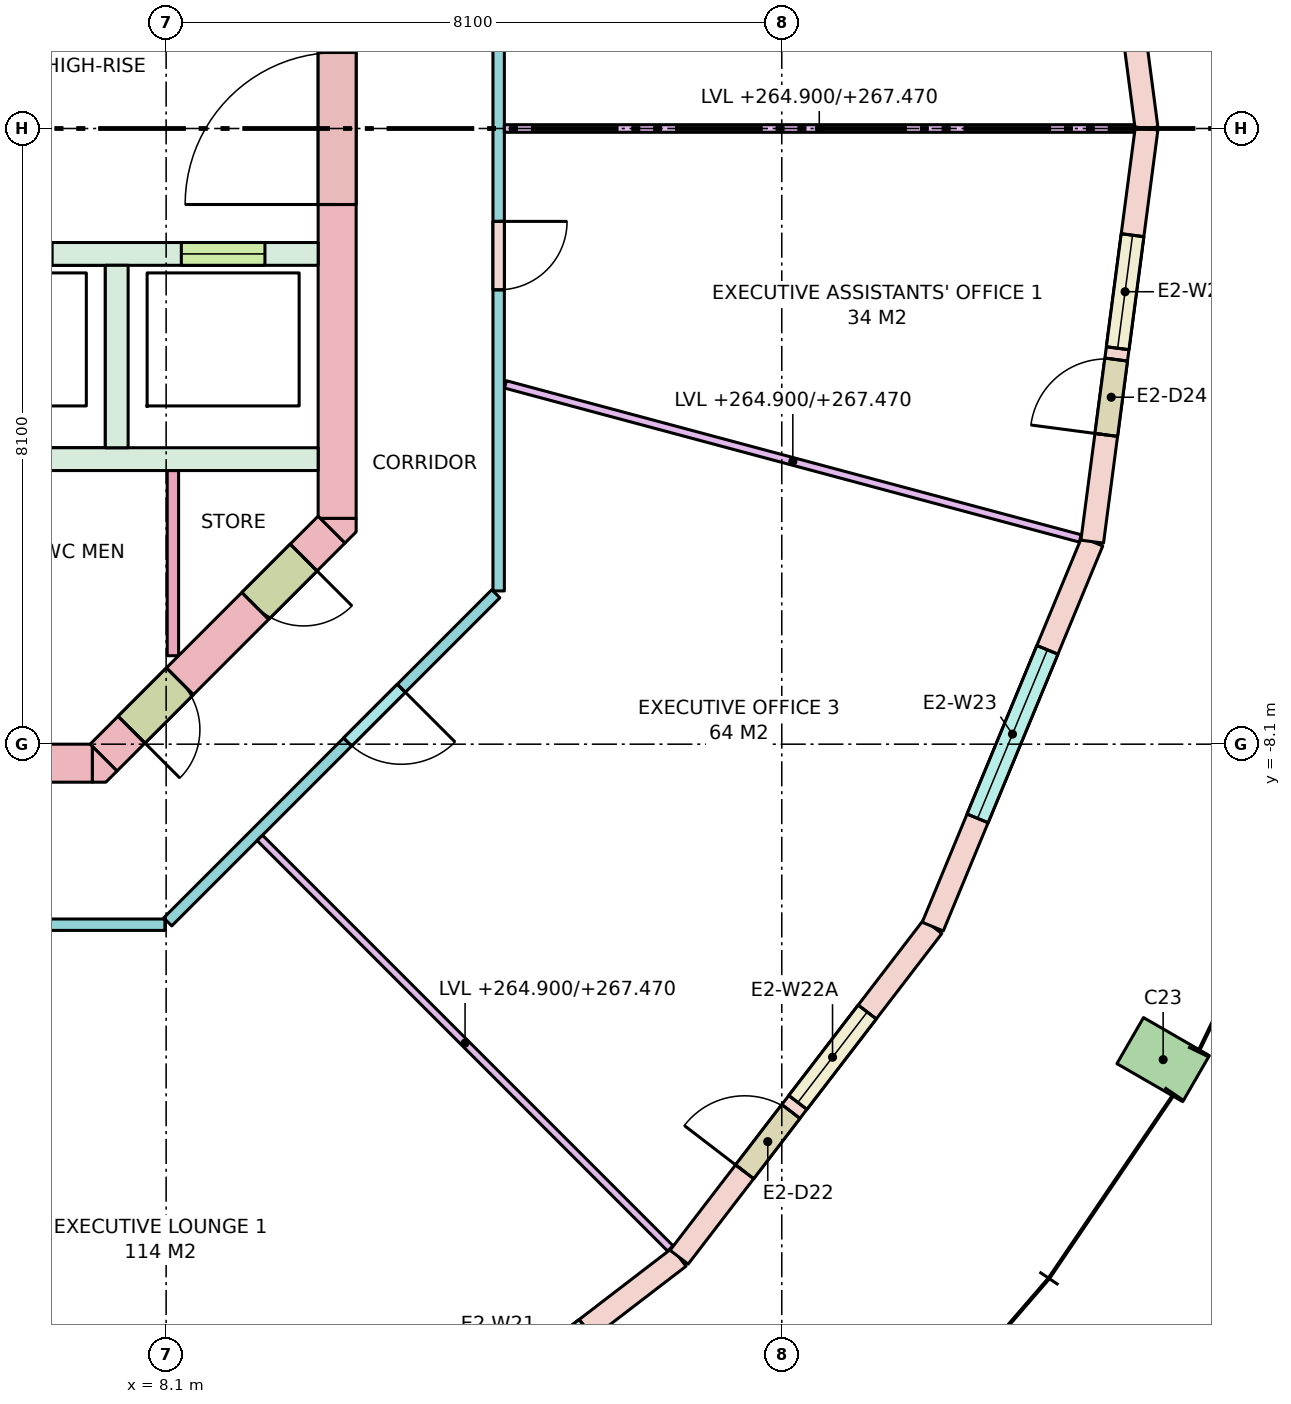
"""IFC4 building model, lengths in metres.
Left out: names, types, materials, properties, quantities, classifications, styles, units other than length and angle.
Written with IfcOpenShell. Run it as: python <this file> out.ifc"""

import sys

from ifc_helpers import new_model, si_unit, direction, frame, frame_2d, origin, origin_2d, place, context, subcontext, project, spatial, polyline, rectangle, outline, extrude, element, fill, save


model = new_model("IFC4")
c1 = context("Model", 3, precision=1e-05, world=origin(), true_north=direction((0.0, 1.0)))
c2 = subcontext(c1, "Body", "Model", "MODEL_VIEW")
j1 = project(units=[si_unit("LENGTHUNIT", "METRE"), si_unit("PLANEANGLEUNIT", "RADIAN")], contexts=[c1])
p1 = place(None, origin())
s1 = spatial("IfcSite", under=j1, at=p1, CompositionType="ELEMENT")
p2 = place(p1, origin())
s2 = spatial("IfcBuilding", under=s1, at=p2, CompositionType="ELEMENT")
p3 = place(p2, frame((0.0, 0.0, 264.9)))
s3 = spatial("IfcBuildingStorey", under=s2, at=p3, CompositionType="ELEMENT", Elevation=264.9)
p4 = place(p3, frame((21.218, -12.25, 0.0), z_axis=(0.0, 0.0, 1.0), x_axis=(0.5, 0.866025403784, 0.0)))
e1 = element("IfcColumn", 1, at=p4, inside=s3, PredefinedType="COLUMN", context=c2, shape_type="SweptSolid", body=[
    extrude(rectangle(XDim=0.7, YDim=1.0, at=origin_2d()), origin(), (0.0, 0.0, 1.0), 3.7),
])
p5 = place(p3, frame((-7.13, -8.35, -0.28), z_axis=(0.0, 0.0, 1.0), x_axis=(1.0, 0.0, 0.0)))
e2 = element("IfcWall", 2, at=p5, inside=s3, PredefinedType="SHEAR", context=c2, shape_type="SweptSolid", body=[
    extrude(rectangle(XDim=14.26, YDim=0.5, at=frame_2d((7.13, 0.0))), origin(), (0.0, 0.0, 1.0), 3.7),
])
p6 = place(p5, frame((8.08, 0.0, 0.28)))
e3 = element("IfcOpeningElement", 3, at=p6, cuts=e2, PredefinedType="OPENING", context=c2, shape_type="SweptSolid", body=[
    extrude(rectangle(XDim=0.7, YDim=2.1, at=frame_2d((0.35, 1.05))), frame((0.0, 0.26, 0.0), z_axis=(0.0, -1.0, 0.0), x_axis=(1.0, 0.0, 0.0)), (0.0, 0.0, 1.0), 0.52),
])
p7 = place(p5, frame((5.58, 0.0, 0.28)))
e4 = element("IfcOpeningElement", 4, at=p7, cuts=e2, PredefinedType="OPENING", context=c2, shape_type="SweptSolid", body=[
    extrude(rectangle(XDim=0.85, YDim=2.1, at=frame_2d((0.425, 1.05))), frame((0.0, 0.26, 0.0), z_axis=(0.0, -1.0, 0.0), x_axis=(1.0, 0.0, 0.0)), (0.0, 0.0, 1.0), 0.52),
])
p8 = place(p5, frame((6.88, 0.0, 0.28)))
e5 = element("IfcOpeningElement", 5, at=p8, cuts=e2, PredefinedType="OPENING", context=c2, shape_type="SweptSolid", body=[
    extrude(rectangle(XDim=0.85, YDim=2.1, at=frame_2d((0.425, 1.05))), frame((0.0, 0.26, 0.0), z_axis=(0.0, -1.0, 0.0), x_axis=(1.0, 0.0, 0.0)), (0.0, 0.0, 1.0), 0.52),
])
p9 = place(p5, frame((9.445, 0.0, 0.28)))
e6 = element("IfcOpeningElement", 6, at=p9, cuts=e2, PredefinedType="OPENING", context=c2, shape_type="SweptSolid", body=[
    extrude(rectangle(XDim=0.9, YDim=2.1, at=frame_2d((0.45, 1.05))), frame((0.0, 0.26, 0.0), z_axis=(0.0, -1.0, 0.0), x_axis=(1.0, 0.0, 0.0)), (0.0, 0.0, 1.0), 0.52),
])
p10 = place(p5, frame((11.431, 0.0, 0.28)))
e7 = element("IfcOpeningElement", 7, at=p10, cuts=e2, PredefinedType="OPENING", context=c2, shape_type="SweptSolid", body=[
    extrude(rectangle(XDim=0.9, YDim=2.1, at=frame_2d((0.45, 1.05))), frame((0.0, 0.26, 0.0), z_axis=(0.0, -1.0, 0.0), x_axis=(1.0, 0.0, 0.0)), (0.0, 0.0, 1.0), 0.52),
])
p11 = place(p3, frame((10.35, -5.13, -0.28), z_axis=(0.0, 0.0, 1.0), x_axis=(0.0, 1.0, 0.0)))
e8 = element("IfcWall", 8, at=p11, inside=s3, PredefinedType="SHEAR", context=c2, shape_type="SweptSolid", body=[
    extrude(rectangle(XDim=10.26, YDim=0.5, at=frame_2d((5.13, 0.0))), origin(), (0.0, 0.0, 1.0), 3.7),
])
p12 = place(p11, frame((4.13, 0.0, 0.28)))
e9 = element("IfcOpeningElement", 9, at=p12, cuts=e8, PredefinedType="OPENING", context=c2, shape_type="SweptSolid", body=[
    extrude(rectangle(XDim=2.0, YDim=2.1, at=frame_2d((1.0, 1.05))), frame((0.0, 0.26, 0.0), z_axis=(0.0, -1.0, 0.0), x_axis=(1.0, 0.0, 0.0)), (0.0, 0.0, 1.0), 0.52),
])
p13 = place(p3, frame((10.277, -5.277, -0.28), z_axis=(0.0, 0.0, 1.0), x_axis=(-0.707106781187, -0.707106781187, 0.0)))
e10 = element("IfcWall", 10, at=p13, inside=s3, PredefinedType="SHEAR", context=c2, shape_type="SweptSolid", body=[
    extrude(rectangle(XDim=4.243, YDim=0.5, at=frame_2d((2.121, 0.0))), origin(), (0.0, 0.0, 1.0), 3.7),
])
p14 = place(p13, frame((2.823, 0.0, 0.28)))
e11 = element("IfcOpeningElement", 11, at=p14, cuts=e10, PredefinedType="OPENING", context=c2, shape_type="SweptSolid", body=[
    extrude(rectangle(XDim=0.9, YDim=2.1, at=frame_2d((0.45, 1.05))), frame((0.0, 0.26, 0.0), z_axis=(0.0, -1.0, 0.0), x_axis=(1.0, 0.0, 0.0)), (0.0, 0.0, 1.0), 0.52),
])
p15 = place(p13, frame((0.52, 0.0, 0.28)))
e12 = element("IfcOpeningElement", 12, at=p15, cuts=e10, PredefinedType="OPENING", context=c2, shape_type="SweptSolid", body=[
    extrude(rectangle(XDim=0.9, YDim=2.1, at=frame_2d((0.45, 1.05))), frame((0.0, 0.26, 0.0), z_axis=(0.0, -1.0, 0.0), x_axis=(1.0, 0.0, 0.0)), (0.0, 0.0, 1.0), 0.52),
])
p16 = place(p3, frame((0.0, 0.0, -0.28)))
e13 = element("IfcWall", 13, at=p16, inside=s3, PredefinedType="SHEAR", context=c2, shape_type="SweptSolid", body=[
    extrude(outline(polyline([(7.307, -8.6), (7.13, -8.6), (7.13, -8.13), (7.454, -8.454), (7.307, -8.6)])), origin(), (0.0, 0.0, 1.0), 3.7),
])
p17 = place(p3, frame((0.0, 0.0, -0.28)))
e14 = element("IfcWall", 14, at=p17, inside=s3, PredefinedType="SHEAR", context=c2, shape_type="SweptSolid", body=[
    extrude(outline(polyline([(10.6, -5.307), (10.454, -5.454), (10.13, -5.13), (10.6, -5.13), (10.6, -5.307)])), origin(), (0.0, 0.0, 1.0), 3.7),
])
p18 = place(p3, frame((2.0, -4.35, 0.0), z_axis=(0.0, 0.0, 1.0), x_axis=(1.0, 0.0, 0.0)))
e15 = element("IfcWall", 15, at=p18, inside=s3, PredefinedType="SOLIDWALL", context=c2, shape_type="SweptSolid", body=[
    extrude(rectangle(XDim=8.1, YDim=0.3, at=frame_2d((4.05, 0.0))), origin(), (0.0, 0.0, 1.0), 3.42),
])
p19 = place(p3, frame((2.0, -1.65, 0.0), z_axis=(0.0, 0.0, 1.0), x_axis=(1.0, 0.0, 0.0)))
e16 = element("IfcWall", 16, at=p19, inside=s3, PredefinedType="SOLIDWALL", context=c2, shape_type="SweptSolid", body=[
    extrude(rectangle(XDim=8.1, YDim=0.3, at=frame_2d((4.05, 0.0))), origin(), (0.0, 0.0, 1.0), 3.42),
])
p20 = place(p19, frame((0.85, 0.0, 0.0)))
e17 = element("IfcOpeningElement", 17, at=p20, cuts=e16, PredefinedType="OPENING", context=c2, shape_type="SweptSolid", body=[
    extrude(rectangle(XDim=1.1, YDim=2.1, at=frame_2d((0.55, 1.05))), frame((0.0, 0.16, 0.0), z_axis=(0.0, -1.0, 0.0), x_axis=(1.0, 0.0, 0.0)), (0.0, 0.0, 1.0), 0.32),
])
p21 = place(p19, frame((3.5, 0.0, 0.0)))
e18 = element("IfcOpeningElement", 18, at=p21, cuts=e16, PredefinedType="OPENING", context=c2, shape_type="SweptSolid", body=[
    extrude(rectangle(XDim=1.1, YDim=2.1, at=frame_2d((0.55, 1.05))), frame((0.0, 0.16, 0.0), z_axis=(0.0, -1.0, 0.0), x_axis=(1.0, 0.0, 0.0)), (0.0, 0.0, 1.0), 0.32),
])
p22 = place(p19, frame((6.3, 0.0, 0.0)))
e19 = element("IfcOpeningElement", 19, at=p22, cuts=e16, PredefinedType="OPENING", context=c2, shape_type="SweptSolid", body=[
    extrude(rectangle(XDim=1.1, YDim=2.1, at=frame_2d((0.55, 1.05))), frame((0.0, 0.16, 0.0), z_axis=(0.0, -1.0, 0.0), x_axis=(1.0, 0.0, 0.0)), (0.0, 0.0, 1.0), 0.32),
])
p23 = place(p3, frame((7.45, -4.2, 0.0), z_axis=(0.0, 0.0, 1.0), x_axis=(0.0, 1.0, 0.0)))
e20 = element("IfcWall", 20, at=p23, inside=s3, PredefinedType="SOLIDWALL", context=c2, shape_type="SweptSolid", body=[
    extrude(rectangle(XDim=2.4, YDim=0.3, at=frame_2d((1.2, 0.0))), origin(), (0.0, 0.0, 1.0), 3.42),
])
p24 = place(p3, frame((21.0, 0.0, 0.0), z_axis=(0.0, 0.0, 1.0), x_axis=(-0.130527087244, 0.991444743541, 0.0)))
e21 = element("IfcWall", 21, at=p24, inside=s3, PredefinedType="STANDARD", context=c2, shape_type="SweptSolid", body=[
    extrude(rectangle(XDim=5.482, YDim=0.3, at=frame_2d((2.741, 0.0))), origin(), (0.0, 0.0, 1.0), 3.42),
])
p25 = place(p24, frame((1.541, 0.0, 0.8)))
e22 = element("IfcOpeningElement", 22, at=p25, cuts=e21, PredefinedType="OPENING", context=c2, shape_type="SweptSolid", body=[
    extrude(rectangle(XDim=2.4, YDim=2.4, at=frame_2d((1.2, 1.2))), frame((0.0, 0.16, 0.0), z_axis=(0.0, -1.0, 0.0), x_axis=(1.0, 0.0, 0.0)), (0.0, 0.0, 1.0), 0.32),
])
p26 = place(p3, frame((10.5, -18.187, 0.0), z_axis=(0.0, 0.0, 1.0), x_axis=(0.793335336593, 0.608784891166, 0.0)))
e23 = element("IfcWall", 23, at=p26, inside=s3, PredefinedType="STANDARD", context=c2, shape_type="SweptSolid", body=[
    extrude(rectangle(XDim=5.482, YDim=0.3, at=frame_2d((2.741, 0.0))), origin(), (0.0, 0.0, 1.0), 3.42),
])
p27 = place(p26, frame((1.541, 0.0, 0.8)))
e24 = element("IfcOpeningElement", 24, at=p27, cuts=e23, PredefinedType="OPENING", context=c2, shape_type="SweptSolid", body=[
    extrude(rectangle(XDim=2.4, YDim=2.4, at=frame_2d((1.2, 1.2))), frame((0.0, 0.16, 0.0), z_axis=(0.0, -1.0, 0.0), x_axis=(1.0, 0.0, 0.0)), (0.0, 0.0, 1.0), 0.32),
])
p28 = place(p3, frame((14.849, -14.849, 0.0), z_axis=(0.0, 0.0, 1.0), x_axis=(0.608784891166, 0.793335336593, 0.0)))
e25 = element("IfcWall", 25, at=p28, inside=s3, PredefinedType="STANDARD", context=c2, shape_type="SweptSolid", body=[
    extrude(rectangle(XDim=5.482, YDim=0.3, at=frame_2d((2.741, 0.0))), origin(), (0.0, 0.0, 1.0), 3.42),
])
p29 = place(p28, frame((1.416, 0.0, 0.0)))
e26 = element("IfcOpeningElement", 26, at=p29, cuts=e25, PredefinedType="OPENING", context=c2, shape_type="SweptSolid", body=[
    extrude(rectangle(XDim=1.0, YDim=2.4, at=frame_2d((0.5, 1.2))), frame((0.0, 0.16, 0.0), z_axis=(0.0, -1.0, 0.0), x_axis=(1.0, 0.0, 0.0)), (0.0, 0.0, 1.0), 0.32),
])
p30 = place(p28, frame((2.566, 0.0, 0.8)))
e27 = element("IfcOpeningElement", 27, at=p30, cuts=e25, PredefinedType="OPENING", context=c2, shape_type="SweptSolid", body=[
    extrude(rectangle(XDim=1.5, YDim=2.4, at=frame_2d((0.75, 1.2))), frame((0.0, 0.16, 0.0), z_axis=(0.0, -1.0, 0.0), x_axis=(1.0, 0.0, 0.0)), (0.0, 0.0, 1.0), 0.32),
])
p31 = place(p3, frame((18.187, -10.5, 0.0), z_axis=(0.0, 0.0, 1.0), x_axis=(0.382688740813, 0.923877333662, 0.0)))
e28 = element("IfcWall", 28, at=p31, inside=s3, PredefinedType="STANDARD", context=c2, shape_type="SweptSolid", body=[
    extrude(rectangle(XDim=5.482, YDim=0.3, at=frame_2d((2.741, 0.0))), origin(), (0.0, 0.0, 1.0), 3.42),
])
p32 = place(p31, frame((1.541, 0.0, 0.8)))
e29 = element("IfcOpeningElement", 29, at=p32, cuts=e28, PredefinedType="OPENING", context=c2, shape_type="SweptSolid", body=[
    extrude(rectangle(XDim=2.4, YDim=2.4, at=frame_2d((1.2, 1.2))), frame((0.0, 0.16, 0.0), z_axis=(0.0, -1.0, 0.0), x_axis=(1.0, 0.0, 0.0)), (0.0, 0.0, 1.0), 0.32),
])
p33 = place(p3, frame((20.284, -5.435, 0.0), z_axis=(0.0, 0.0, 1.0), x_axis=(0.130527087244, 0.991444743541, 0.0)))
e30 = element("IfcWall", 30, at=p33, inside=s3, PredefinedType="STANDARD", context=c2, shape_type="SweptSolid", body=[
    extrude(rectangle(XDim=5.482, YDim=0.3, at=frame_2d((2.741, 0.0))), origin(), (0.0, 0.0, 1.0), 3.42),
])
p34 = place(p33, frame((1.416, 0.0, 0.0)))
e31 = element("IfcOpeningElement", 31, at=p34, cuts=e30, PredefinedType="OPENING", context=c2, shape_type="SweptSolid", body=[
    extrude(rectangle(XDim=1.0, YDim=2.4, at=frame_2d((0.5, 1.2))), frame((0.0, 0.16, 0.0), z_axis=(0.0, -1.0, 0.0), x_axis=(1.0, 0.0, 0.0)), (0.0, 0.0, 1.0), 0.32),
])
p35 = place(p33, frame((2.566, 0.0, 0.8)))
e32 = element("IfcOpeningElement", 32, at=p35, cuts=e30, PredefinedType="OPENING", context=c2, shape_type="SweptSolid", body=[
    extrude(rectangle(XDim=1.5, YDim=2.4, at=frame_2d((0.75, 1.2))), frame((0.0, 0.16, 0.0), z_axis=(0.0, -1.0, 0.0), x_axis=(1.0, 0.0, 0.0)), (0.0, 0.0, 1.0), 0.32),
])
p36 = place(p3, frame((8.189, -6.936, 0.0), z_axis=(0.0, 0.0, 1.0), x_axis=(0.0, 1.0, 0.0)))
e33 = element("IfcWall", 33, at=p36, inside=s3, PredefinedType="PARTITIONING", context=c2, shape_type="SweptSolid", body=[
    extrude(rectangle(XDim=2.436, YDim=0.15, at=frame_2d((1.218, 0.0))), origin(), (0.0, 0.0, 1.0), 3.42),
])
p37 = place(p3, frame((12.438, -6.121, 0.0), z_axis=(0.0, 0.0, 1.0), x_axis=(-0.707106781187, -0.707106781187, 0.0)))
e34 = element("IfcWall", 34, at=p37, inside=s3, PredefinedType="PARTITIONING", context=c2, shape_type="SweptSolid", body=[
    extrude(rectangle(XDim=6.105, YDim=0.15, at=frame_2d((3.053, 0.0))), origin(), (0.0, 0.0, 1.0), 2.57),
])
p38 = place(p37, frame((1.758, 0.0, 0.0)))
e35 = element("IfcOpeningElement", 35, at=p38, cuts=e34, PredefinedType="OPENING", context=c2, shape_type="SweptSolid", body=[
    extrude(rectangle(XDim=1.0, YDim=2.1, at=frame_2d((0.5, 1.05))), frame((0.0, 0.085, 0.0), z_axis=(0.0, -1.0, 0.0), x_axis=(1.0, 0.0, 0.0)), (0.0, 0.0, 1.0), 0.17),
])
p39 = place(p3, frame((8.084, -10.475, 0.0), z_axis=(0.0, 0.0, 1.0), x_axis=(-1.0, 0.0, 0.0)))
e36 = element("IfcWall", 36, at=p39, inside=s3, PredefinedType="PARTITIONING", context=c2, shape_type="SweptSolid", body=[
    extrude(rectangle(XDim=16.167, YDim=0.15, at=frame_2d((8.084, 0.0))), origin(), (0.0, 0.0, 1.0), 2.57),
])
p40 = place(p39, frame((12.015, 0.0, 0.0)))
e37 = element("IfcOpeningElement", 37, at=p40, cuts=e36, PredefinedType="OPENING", context=c2, shape_type="SweptSolid", body=[
    extrude(rectangle(XDim=1.0, YDim=2.1, at=frame_2d((0.5, 1.05))), frame((0.0, 0.085, 0.0), z_axis=(0.0, -1.0, 0.0), x_axis=(1.0, 0.0, 0.0)), (0.0, 0.0, 1.0), 0.17),
])
p41 = place(p39, frame((9.038, 0.0, 0.0)))
e38 = element("IfcOpeningElement", 38, at=p41, cuts=e36, PredefinedType="OPENING", context=c2, shape_type="SweptSolid", body=[
    extrude(rectangle(XDim=0.9, YDim=2.1, at=frame_2d((0.45, 1.05))), frame((0.0, 0.085, 0.0), z_axis=(0.0, -1.0, 0.0), x_axis=(1.0, 0.0, 0.0)), (0.0, 0.0, 1.0), 0.17),
])
p42 = place(p39, frame((3.167, 0.0, 0.0)))
e39 = element("IfcOpeningElement", 39, at=p42, cuts=e36, PredefinedType="OPENING", context=c2, shape_type="SweptSolid", body=[
    extrude(rectangle(XDim=1.8, YDim=2.1, at=frame_2d((0.9, 1.05))), frame((0.0, 0.085, 0.0), z_axis=(0.0, -1.0, 0.0), x_axis=(1.0, 0.0, 0.0)), (0.0, 0.0, 1.0), 0.17),
])
p43 = place(p3, frame((12.475, 6.084, 0.0), z_axis=(0.0, 0.0, 1.0), x_axis=(0.0, -1.0, 0.0)))
e40 = element("IfcWall", 40, at=p43, inside=s3, PredefinedType="PARTITIONING", context=c2, shape_type="SweptSolid", body=[
    extrude(rectangle(XDim=12.167, YDim=0.15, at=frame_2d((6.084, 0.0))), origin(), (0.0, 0.0, 1.0), 2.57),
])
p44 = place(p43, frame((7.306, 0.0, 0.0)))
e41 = element("IfcOpeningElement", 41, at=p44, cuts=e40, PredefinedType="OPENING", context=c2, shape_type="SweptSolid", body=[
    extrude(rectangle(XDim=0.9, YDim=2.1, at=frame_2d((0.45, 1.05))), frame((0.0, 0.085, 0.0), z_axis=(0.0, -1.0, 0.0), x_axis=(1.0, 0.0, 0.0)), (0.0, 0.0, 1.0), 0.17),
])
p45 = place(p43, frame((2.567, 0.0, 0.0)))
e42 = element("IfcOpeningElement", 42, at=p45, cuts=e40, PredefinedType="OPENING", context=c2, shape_type="SweptSolid", body=[
    extrude(rectangle(XDim=1.0, YDim=2.1, at=frame_2d((0.5, 1.05))), frame((0.0, 0.085, 0.0), z_axis=(0.0, -1.0, 0.0), x_axis=(1.0, 0.0, 0.0)), (0.0, 0.0, 1.0), 0.17),
])
p46 = place(p3, frame((12.55, 0.0, 0.0), z_axis=(0.0, 0.0, 1.0), x_axis=(1.0, 0.0, 0.0)))
e43 = element("IfcWall", 43, at=p46, inside=s3, PredefinedType="PARTITIONING", context=c2, shape_type="SweptSolid", body=[
    extrude(rectangle(XDim=8.287, YDim=0.1, at=frame_2d((4.143, 0.0))), origin(), (0.0, 0.0, 1.0), 2.57),
])
p47 = place(p3, frame((9.333, -9.333, 0.0), z_axis=(0.0, 0.0, 1.0), x_axis=(0.707106781187, -0.707106781187, 0.0)))
e44 = element("IfcWall", 44, at=p47, inside=s3, PredefinedType="PARTITIONING", context=c2, shape_type="SweptSolid", body=[
    extrude(rectangle(XDim=7.639, YDim=0.1, at=frame_2d((3.819, 0.0))), origin(), (0.0, 0.0, 1.0), 2.57),
])
p48 = place(p3, frame((12.564, -3.367, 0.0), z_axis=(0.0, 0.0, 1.0), x_axis=(0.965933576344, -0.258790119773, 0.0)))
e45 = element("IfcWall", 45, at=p48, inside=s3, PredefinedType="PARTITIONING", context=c2, shape_type="SweptSolid", body=[
    extrude(rectangle(XDim=7.829, YDim=0.1, at=frame_2d((3.915, 0.0))), origin(), (0.0, 0.0, 1.0), 2.57),
])
p49 = place(p29, origin())
e46 = element("IfcDoor", 46, at=p49, inside=s3, OperationType="SINGLE_SWING_LEFT", PredefinedType="DOOR", context=c2, shape_type="SweptSolid", body=[
    extrude(rectangle(XDim=1.0, YDim=2.4, at=frame_2d((0.5, 1.2))), frame((0.0, 0.025, 0.0), z_axis=(0.0, -1.0, 0.0), x_axis=(1.0, 0.0, 0.0)), (0.0, 0.0, 1.0), 0.05),
])
fill(e26, e46)
p50 = place(p30, origin())
e47 = element("IfcWindow", 47, at=p50, inside=s3, PartitioningType="SINGLE_PANEL", PredefinedType="WINDOW", context=c2, shape_type="SweptSolid", body=[
    extrude(rectangle(XDim=1.5, YDim=2.4, at=frame_2d((0.75, 1.2))), frame((0.0, 0.03, 0.0), z_axis=(0.0, -1.0, 0.0), x_axis=(1.0, 0.0, 0.0)), (0.0, 0.0, 1.0), 0.06),
])
fill(e27, e47)
p51 = place(p32, origin())
e48 = element("IfcWindow", 48, at=p51, inside=s3, PartitioningType="SINGLE_PANEL", PredefinedType="WINDOW", context=c2, shape_type="SweptSolid", body=[
    extrude(rectangle(XDim=2.4, YDim=2.4, at=frame_2d((1.2, 1.2))), frame((0.0, 0.03, 0.0), z_axis=(0.0, -1.0, 0.0), x_axis=(1.0, 0.0, 0.0)), (0.0, 0.0, 1.0), 0.06),
])
fill(e29, e48)
p52 = place(p34, origin())
e49 = element("IfcDoor", 49, at=p52, inside=s3, OperationType="SINGLE_SWING_LEFT", PredefinedType="DOOR", context=c2, shape_type="SweptSolid", body=[
    extrude(rectangle(XDim=1.0, YDim=2.4, at=frame_2d((0.5, 1.2))), frame((0.0, 0.025, 0.0), z_axis=(0.0, -1.0, 0.0), x_axis=(1.0, 0.0, 0.0)), (0.0, 0.0, 1.0), 0.05),
])
fill(e31, e49)
p53 = place(p35, origin())
e50 = element("IfcWindow", 50, at=p53, inside=s3, PartitioningType="SINGLE_PANEL", PredefinedType="WINDOW", context=c2, shape_type="SweptSolid", body=[
    extrude(rectangle(XDim=1.5, YDim=2.4, at=frame_2d((0.75, 1.2))), frame((0.0, 0.03, 0.0), z_axis=(0.0, -1.0, 0.0), x_axis=(1.0, 0.0, 0.0)), (0.0, 0.0, 1.0), 0.06),
])
fill(e32, e50)
p54 = place(p22, origin())
e51 = element("IfcDoor", 51, at=p54, inside=s3, OperationType="DOUBLE_DOOR_SLIDING", PredefinedType="DOOR", context=c2, shape_type="SweptSolid", body=[
    extrude(rectangle(XDim=1.1, YDim=2.1, at=frame_2d((0.55, 1.05))), frame((0.0, 0.025, 0.0), z_axis=(0.0, -1.0, 0.0), x_axis=(1.0, 0.0, 0.0)), (0.0, 0.0, 1.0), 0.05),
])
fill(e19, e51)
p55 = place(p12, origin())
e52 = element("IfcDoor", 52, at=p55, inside=s3, OperationType="DOUBLE_DOOR_SINGLE_SWING", PredefinedType="DOOR", context=c2, shape_type="SweptSolid", body=[
    extrude(rectangle(XDim=2.0, YDim=2.1, at=frame_2d((1.0, 1.05))), frame((0.0, 0.025, 0.0), z_axis=(0.0, -1.0, 0.0), x_axis=(1.0, 0.0, 0.0)), (0.0, 0.0, 1.0), 0.05),
])
fill(e9, e52)
p56 = place(p14, origin())
e53 = element("IfcDoor", 53, at=p56, inside=s3, OperationType="SINGLE_SWING_RIGHT", PredefinedType="DOOR", context=c2, shape_type="SweptSolid", body=[
    extrude(rectangle(XDim=0.9, YDim=2.1, at=frame_2d((0.45, 1.05))), frame((0.0, 0.025, 0.0), z_axis=(0.0, -1.0, 0.0), x_axis=(1.0, 0.0, 0.0)), (0.0, 0.0, 1.0), 0.05),
])
fill(e11, e53)
p57 = place(p15, origin())
e54 = element("IfcDoor", 54, at=p57, inside=s3, OperationType="SINGLE_SWING_LEFT", PredefinedType="DOOR", context=c2, shape_type="SweptSolid", body=[
    extrude(rectangle(XDim=0.9, YDim=2.1, at=frame_2d((0.45, 1.05))), frame((0.0, 0.025, 0.0), z_axis=(0.0, -1.0, 0.0), x_axis=(1.0, 0.0, 0.0)), (0.0, 0.0, 1.0), 0.05),
])
fill(e12, e54)
p58 = place(p38, origin())
e55 = element("IfcDoor", 55, at=p58, inside=s3, OperationType="SINGLE_SWING_LEFT", PredefinedType="DOOR", context=c2, shape_type="SweptSolid", body=[
    extrude(rectangle(XDim=1.0, YDim=2.1, at=frame_2d((0.5, 1.05))), frame((0.0, 0.025, 0.0), z_axis=(0.0, -1.0, 0.0), x_axis=(1.0, 0.0, 0.0)), (0.0, 0.0, 1.0), 0.05),
])
fill(e35, e55)
p59 = place(p44, origin())
e56 = element("IfcDoor", 56, at=p59, inside=s3, OperationType="SINGLE_SWING_LEFT", PredefinedType="DOOR", context=c2, shape_type="SweptSolid", body=[
    extrude(rectangle(XDim=0.9, YDim=2.1, at=frame_2d((0.45, 1.05))), frame((0.0, 0.025, 0.0), z_axis=(0.0, -1.0, 0.0), x_axis=(1.0, 0.0, 0.0)), (0.0, 0.0, 1.0), 0.05),
])
fill(e41, e56)
save(model, sys.argv[1])
